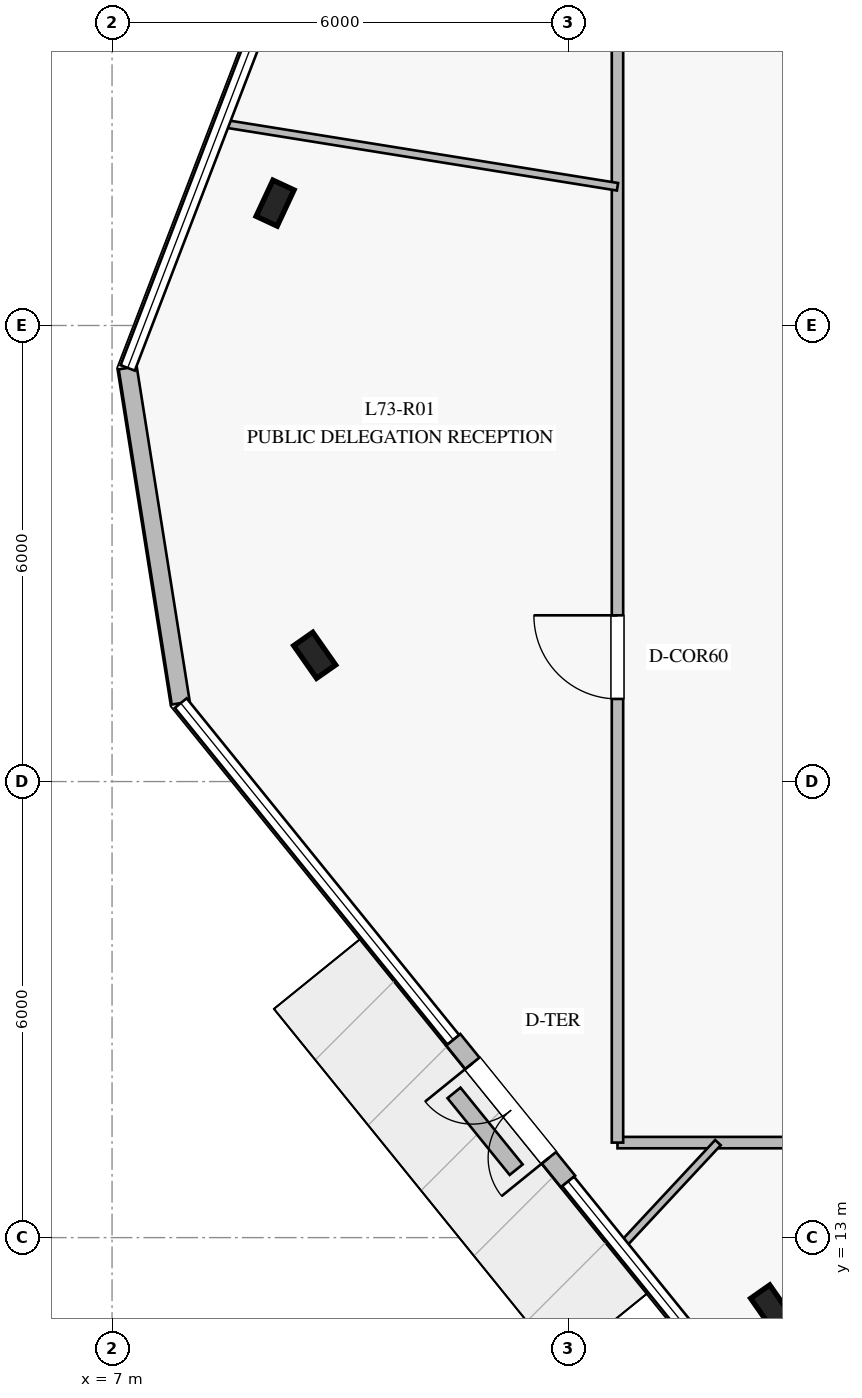
"""IFC4 building model, lengths in metres.
Left out: names, types, materials, properties, quantities, classifications, styles, units other than length and angle.
Written with IfcOpenShell. Run it as: python <this file> out.ifc"""

import sys

from ifc_helpers import new_model, si_unit, direction, frame, frame_2d, origin, origin_2d, place, context, subcontext, project, spatial, rectangle, i_section, extrude, element, fill, save


model = new_model("IFC4")
c1 = context("Model", 3, precision=1e-05, world=origin(), true_north=direction((0.0, 1.0)))
c2 = subcontext(c1, "Body", "Model", "MODEL_VIEW")
j1 = project(units=[si_unit("LENGTHUNIT", "METRE"), si_unit("PLANEANGLEUNIT", "RADIAN")], contexts=[c1])
p1 = place(None, origin())
s1 = spatial("IfcSite", under=j1, at=p1, CompositionType="ELEMENT")
p2 = place(p1, origin())
s2 = spatial("IfcBuilding", under=s1, at=p2, CompositionType="ELEMENT")
p3 = place(p2, frame((0.0, 0.0, 302.2)))
s3 = spatial("IfcBuildingStorey", under=s2, at=p3, CompositionType="ELEMENT", Elevation=302.2)
for number, where, z_axis, x_axis in (
    (1, (9.145, 26.61, 0.0), (0.0, 0.0, 1.0), (0.423, 0.906, 0.0)),
    (2, (9.666, 20.661, 0.0), (0.0, 0.0, 1.0), (-0.574, 0.819, 0.0)),
    (3, (15.678, 12.074, 0.0), (0.0, 0.0, 1.0), (-0.574, 0.819, 0.0)),
):
    element("IfcColumn", number, at=place(p3, frame(where, z_axis=z_axis, x_axis=x_axis)), inside=s3, PredefinedType="COLUMN", context=c2, shape_type="SweptSolid", body=[
        extrude(i_section(OverallWidth=0.306, OverallDepth=0.524, WebThickness=0.021, FlangeThickness=0.04, at=origin_2d()), origin(), (0.0, 0.0, 1.0), 4.0),
    ])
p4 = place(p3, frame((7.206, 24.442, 0.0), z_axis=(0.0, 0.0, 1.0), x_axis=(0.156333211552, -0.987704372252, 0.0)))
e4 = element("IfcWall", 4, at=p4, inside=s3, PredefinedType="STANDARD", context=c2, shape_type="SweptSolid", body=[
    extrude(rectangle(XDim=4.465, YDim=0.24, at=frame_2d((2.232, 0.0))), origin(), (0.0, 0.0, 1.0), 3.78),
])
p5 = place(p3, frame((11.489, 15.604, 0.0), z_axis=(0.0, 0.0, 1.0), x_axis=(0.629508336797, -0.776993728355, 0.0)))
e5 = element("IfcWall", 5, at=p5, inside=s3, PredefinedType="STANDARD", context=c2, shape_type="SweptSolid", body=[
    extrude(rectangle(XDim=2.4, YDim=0.24, at=frame_2d((1.2, 0.0))), origin(), (0.0, 0.0, 1.0), 3.78),
])
p6 = place(p5, frame((0.4, 0.0, 0.0)))
e6 = element("IfcOpeningElement", 6, at=p6, cuts=e5, PredefinedType="OPENING", context=c2, shape_type="SweptSolid", body=[
    extrude(rectangle(XDim=1.6, YDim=2.25, at=frame_2d((0.8, 1.125))), frame((0.0, 0.13, 0.0), z_axis=(0.0, -1.0, 0.0), x_axis=(1.0, 0.0, 0.0)), (0.0, 0.0, 1.0), 0.26),
])
p7 = place(p3, frame((11.499, 14.904, 0.0), z_axis=(0.0, 0.0, 1.0), x_axis=(0.629311706509, -0.777152993979, 0.0)))
e7 = element("IfcWall", 7, at=p7, inside=s3, PredefinedType="USERDEFINED", context=c2, shape_type="SweptSolid", body=[
    extrude(rectangle(XDim=1.3, YDim=0.22, at=frame_2d((0.65, 0.0))), origin(), (0.0, 0.0, 1.0), 0.4),
])
p8 = place(p3, frame((36.35, 14.25, 0.0), z_axis=(0.0, 0.0, 1.0), x_axis=(-1.0, 0.0, 0.0)))
e8 = element("IfcWall", 8, at=p8, inside=s3, PredefinedType="PARTITIONING", context=c2, shape_type="SweptSolid", body=[
    extrude(rectangle(XDim=22.7, YDim=0.15, at=frame_2d((11.35, 0.0))), origin(), (0.0, 0.0, 1.0), 3.27),
])
p9 = place(p8, frame((15.001, 0.0, 0.0)))
e9 = element("IfcOpeningElement", 9, at=p9, cuts=e8, PredefinedType="OPENING", context=c2, shape_type="SweptSolid", body=[
    extrude(rectangle(XDim=1.1, YDim=2.2, at=frame_2d((0.55, 1.1))), frame((0.0, 0.085, 0.0), z_axis=(0.0, -1.0, 0.0), x_axis=(1.0, 0.0, 0.0)), (0.0, 0.0, 1.0), 0.17),
])
p10 = place(p3, frame((13.65, 14.25, 0.0), z_axis=(0.0, 0.0, 1.0), x_axis=(0.0, 1.0, 0.0)))
e10 = element("IfcWall", 10, at=p10, inside=s3, PredefinedType="PARTITIONING", context=c2, shape_type="SweptSolid", body=[
    extrude(rectangle(XDim=21.5, YDim=0.15, at=frame_2d((10.75, 0.0))), origin(), (0.0, 0.0, 1.0), 3.05),
])
p11 = place(p10, frame((5.837, 0.0, 0.0)))
e11 = element("IfcOpeningElement", 11, at=p11, cuts=e10, PredefinedType="OPENING", context=c2, shape_type="SweptSolid", body=[
    extrude(rectangle(XDim=1.1, YDim=2.2, at=frame_2d((0.55, 1.1))), frame((0.0, 0.085, 0.0), z_axis=(0.0, -1.0, 0.0), x_axis=(1.0, 0.0, 0.0)), (0.0, 0.0, 1.0), 0.17),
])
p12 = place(p3, frame((13.65, 26.825, 0.0), z_axis=(0.0, 0.0, 1.0), x_axis=(-0.987343097262, 0.158598891199, 0.0)))
e12 = element("IfcWall", 12, at=p12, inside=s3, PredefinedType="MOVABLE", context=c2, shape_type="SweptSolid", body=[
    extrude(rectangle(XDim=5.259, YDim=0.1, at=frame_2d((2.629, 0.0))), origin(), (0.0, 0.0, 1.0), 3.28),
])
p13 = place(p3, frame((14.972, 14.25, 0.0), z_axis=(0.0, 0.0, 1.0), x_axis=(-0.681882363678, -0.731461852802, 0.0)))
e13 = element("IfcWall", 13, at=p13, inside=s3, PredefinedType="MOVABLE", context=c2, shape_type="SweptSolid", body=[
    extrude(rectangle(XDim=1.856, YDim=0.1, at=frame_2d((0.928, 0.0))), origin(), (0.0, 0.0, 1.0), 3.27),
])
p14 = place(p6, frame((1.6, 0.0, 0.0), z_axis=(0.0, 0.0, 1.0), x_axis=(-1.0, 0.0, 0.0)))
e14 = element("IfcDoor", 14, at=p14, inside=s3, OperationType="DOUBLE_DOOR_SINGLE_SWING", PredefinedType="DOOR", context=c2, shape_type="SweptSolid", body=[
    extrude(rectangle(XDim=1.6, YDim=2.25, at=frame_2d((0.8, 1.125))), frame((0.0, 0.025, 0.0), z_axis=(0.0, -1.0, 0.0), x_axis=(1.0, 0.0, 0.0)), (0.0, 0.0, 1.0), 0.05),
])
fill(e6, e14)
p15 = place(p11, origin())
e15 = element("IfcDoor", 15, at=p15, inside=s3, OperationType="SINGLE_SWING_RIGHT", PredefinedType="DOOR", context=c2, shape_type="SweptSolid", body=[
    extrude(rectangle(XDim=1.1, YDim=2.2, at=frame_2d((0.55, 1.1))), frame((0.0, 0.025, 0.0), z_axis=(0.0, -1.0, 0.0), x_axis=(1.0, 0.0, 0.0)), (0.0, 0.0, 1.0), 0.05),
])
fill(e11, e15)
save(model, sys.argv[1])
